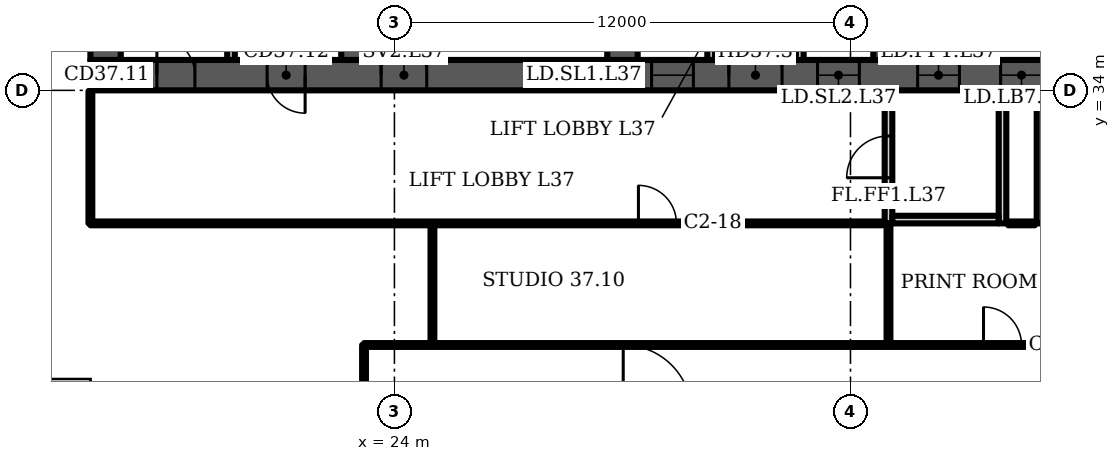
"""IFC4 building model, lengths in metres.
Left out: names, types, materials, properties, quantities, classifications, styles, units other than length and angle.
Written with IfcOpenShell. Run it as: python <this file> out.ifc"""

import sys

from ifc_helpers import new_model, si_unit, direction, frame, frame_2d, origin, place, context, subcontext, project, spatial, polyline, rectangle, outline, extrude, element, fill, save


model = new_model("IFC4")
c1 = context("Model", 3, precision=1e-05, world=origin(), true_north=direction((0.0, 1.0)))
c2 = subcontext(c1, "Body", "Model", "MODEL_VIEW")
j1 = project(units=[si_unit("LENGTHUNIT", "METRE"), si_unit("PLANEANGLEUNIT", "RADIAN")], contexts=[c1])
p1 = place(None, origin())
s1 = spatial("IfcSite", under=j1, at=p1, CompositionType="ELEMENT")
p2 = place(p1, origin())
s2 = spatial("IfcBuilding", under=s1, at=p2, CompositionType="ELEMENT")
p3 = place(p2, frame((0.0, 0.0, 155.5)))
s3 = spatial("IfcBuildingStorey", under=s2, at=p3, CompositionType="ELEMENT", Elevation=155.5)
p4 = place(p3, frame((16.0, 34.4, 0.0), z_axis=(0.0, 0.0, 1.0), x_axis=(1.0, 0.0, 0.0)))
e1 = element("IfcWall", 1, at=p4, inside=s3, PredefinedType="SHEAR", context=c2, shape_type="SweptSolid", body=[
    extrude(rectangle(XDim=42.0, YDim=0.8, at=frame_2d((21.0, 0.0))), origin(), (0.0, 0.0, 1.0), 3.6),
])
p5 = place(p4, frame((1.75, 0.0, 0.0)))
e2 = element("IfcOpeningElement", 2, at=p5, cuts=e1, PredefinedType="OPENING", context=c2, shape_type="SweptSolid", body=[
    extrude(rectangle(XDim=1.0, YDim=2.1, at=frame_2d((0.5, 1.05))), frame((0.0, 0.41, 0.0), z_axis=(0.0, -1.0, 0.0), x_axis=(1.0, 0.0, 0.0)), (0.0, 0.0, 1.0), 0.82),
])
p6 = place(p4, frame((4.65, 0.0, 0.0)))
e3 = element("IfcOpeningElement", 3, at=p6, cuts=e1, PredefinedType="OPENING", context=c2, shape_type="SweptSolid", body=[
    extrude(rectangle(XDim=1.0, YDim=2.1, at=frame_2d((0.5, 1.05))), frame((0.0, 0.41, 0.0), z_axis=(0.0, -1.0, 0.0), x_axis=(1.0, 0.0, 0.0)), (0.0, 0.0, 1.0), 0.82),
])
p7 = place(p4, frame((7.65, 0.0, 0.0)))
e4 = element("IfcOpeningElement", 4, at=p7, cuts=e1, PredefinedType="OPENING", context=c2, shape_type="SweptSolid", body=[
    extrude(rectangle(XDim=1.2, YDim=2.1, at=frame_2d((0.6, 1.05))), frame((0.0, 0.41, 0.0), z_axis=(0.0, -1.0, 0.0), x_axis=(1.0, 0.0, 0.0)), (0.0, 0.0, 1.0), 0.82),
])
p8 = place(p4, frame((14.767, 0.0, 0.0)))
e5 = element("IfcOpeningElement", 5, at=p8, cuts=e1, PredefinedType="OPENING", context=c2, shape_type="SweptSolid", body=[
    extrude(rectangle(XDim=1.1, YDim=2.1, at=frame_2d((0.55, 1.05))), frame((0.0, 0.41, 0.0), z_axis=(0.0, -1.0, 0.0), x_axis=(1.0, 0.0, 0.0)), (0.0, 0.0, 1.0), 0.82),
])
p9 = place(p4, frame((19.133, 0.0, 0.0)))
e6 = element("IfcOpeningElement", 6, at=p9, cuts=e1, PredefinedType="OPENING", context=c2, shape_type="SweptSolid", body=[
    extrude(rectangle(XDim=1.1, YDim=2.1, at=frame_2d((0.55, 1.05))), frame((0.0, 0.41, 0.0), z_axis=(0.0, -1.0, 0.0), x_axis=(1.0, 0.0, 0.0)), (0.0, 0.0, 1.0), 0.82),
])
p10 = place(p4, frame((16.8, 0.0, 0.0)))
e7 = element("IfcOpeningElement", 7, at=p10, cuts=e1, PredefinedType="OPENING", context=c2, shape_type="SweptSolid", body=[
    extrude(rectangle(XDim=1.4, YDim=2.1, at=frame_2d((0.7, 1.05))), frame((0.0, 0.41, 0.0), z_axis=(0.0, -1.0, 0.0), x_axis=(1.0, 0.0, 0.0)), (0.0, 0.0, 1.0), 0.82),
])
p11 = place(p4, frame((21.767, 0.0, 0.0)))
e8 = element("IfcOpeningElement", 8, at=p11, cuts=e1, PredefinedType="OPENING", context=c2, shape_type="SweptSolid", body=[
    extrude(rectangle(XDim=1.1, YDim=2.1, at=frame_2d((0.55, 1.05))), frame((0.0, 0.41, 0.0), z_axis=(0.0, -1.0, 0.0), x_axis=(1.0, 0.0, 0.0)), (0.0, 0.0, 1.0), 0.82),
])
p12 = place(p4, frame((23.95, 0.0, 0.0)))
e9 = element("IfcOpeningElement", 9, at=p12, cuts=e1, PredefinedType="OPENING", context=c2, shape_type="SweptSolid", body=[
    extrude(rectangle(XDim=1.1, YDim=2.1, at=frame_2d((0.55, 1.05))), frame((0.0, 0.41, 0.0), z_axis=(0.0, -1.0, 0.0), x_axis=(1.0, 0.0, 0.0)), (0.0, 0.0, 1.0), 0.82),
])
p13 = place(p4, frame((26.133, 0.0, 0.0)))
e10 = element("IfcOpeningElement", 10, at=p13, cuts=e1, PredefinedType="OPENING", context=c2, shape_type="SweptSolid", body=[
    extrude(rectangle(XDim=1.1, YDim=2.1, at=frame_2d((0.55, 1.05))), frame((0.0, 0.41, 0.0), z_axis=(0.0, -1.0, 0.0), x_axis=(1.0, 0.0, 0.0)), (0.0, 0.0, 1.0), 0.82),
])
p14 = place(p4, frame((33.15, 0.0, 0.0)))
e11 = element("IfcOpeningElement", 11, at=p14, cuts=e1, PredefinedType="OPENING", context=c2, shape_type="SweptSolid", body=[
    extrude(rectangle(XDim=1.2, YDim=2.1, at=frame_2d((0.6, 1.05))), frame((0.0, 0.41, 0.0), z_axis=(0.0, -1.0, 0.0), x_axis=(1.0, 0.0, 0.0)), (0.0, 0.0, 1.0), 0.82),
])
p15 = place(p4, frame((35.817, 0.0, 0.0)))
e12 = element("IfcOpeningElement", 12, at=p15, cuts=e1, PredefinedType="OPENING", context=c2, shape_type="SweptSolid", body=[
    extrude(rectangle(XDim=1.0, YDim=2.1, at=frame_2d((0.5, 1.05))), frame((0.0, 0.41, 0.0), z_axis=(0.0, -1.0, 0.0), x_axis=(1.0, 0.0, 0.0)), (0.0, 0.0, 1.0), 0.82),
])
p16 = place(p4, frame((39.95, 0.0, 0.0)))
e13 = element("IfcOpeningElement", 13, at=p16, cuts=e1, PredefinedType="OPENING", context=c2, shape_type="SweptSolid", body=[
    extrude(rectangle(XDim=1.0, YDim=2.1, at=frame_2d((0.5, 1.05))), frame((0.0, 0.41, 0.0), z_axis=(0.0, -1.0, 0.0), x_axis=(1.0, 0.0, 0.0)), (0.0, 0.0, 1.0), 0.82),
])
p17 = place(p4, frame((37.767, 0.0, 0.0)))
e14 = element("IfcOpeningElement", 14, at=p17, cuts=e1, PredefinedType="OPENING", context=c2, shape_type="SweptSolid", body=[
    extrude(rectangle(XDim=1.4, YDim=2.1, at=frame_2d((0.7, 1.05))), frame((0.0, 0.41, 0.0), z_axis=(0.0, -1.0, 0.0), x_axis=(1.0, 0.0, 0.0)), (0.0, 0.0, 1.0), 0.82),
])
p18 = place(p3, frame((16.4, 34.8, 0.0), z_axis=(0.0, 0.0, 1.0), x_axis=(0.0, 1.0, 0.0)))
e15 = element("IfcWall", 15, at=p18, inside=s3, PredefinedType="SHEAR", context=c2, shape_type="SweptSolid", body=[
    extrude(rectangle(XDim=13.184, YDim=0.8, at=frame_2d((6.592, 0.0))), origin(), (0.0, 0.0, 1.0), 3.6),
])
p19 = place(p3, frame((23.0, 34.8, 0.0), z_axis=(0.0, 0.0, 1.0), x_axis=(0.0, 1.0, 0.0)))
e16 = element("IfcWall", 16, at=p19, inside=s3, PredefinedType="SHEAR", context=c2, shape_type="SweptSolid", body=[
    extrude(rectangle(XDim=13.762, YDim=0.8, at=frame_2d((6.881, 0.0))), origin(), (0.0, 0.0, 1.0), 3.6),
])
p20 = place(p19, frame((10.0, 0.0, 0.0)))
e17 = element("IfcOpeningElement", 17, at=p20, cuts=e16, PredefinedType="OPENING", context=c2, shape_type="SweptSolid", body=[
    extrude(rectangle(XDim=1.0, YDim=2.1, at=frame_2d((0.5, 1.05))), frame((0.0, 0.41, 0.0), z_axis=(0.0, -1.0, 0.0), x_axis=(1.0, 0.0, 0.0)), (0.0, 0.0, 1.0), 0.82),
])
p21 = place(p3, frame((30.0, 34.8, 0.0), z_axis=(0.0, 0.0, 1.0), x_axis=(0.0, 1.0, 0.0)))
e18 = element("IfcWall", 18, at=p21, inside=s3, PredefinedType="SHEAR", context=c2, shape_type="SweptSolid", body=[
    extrude(rectangle(XDim=14.374, YDim=0.8, at=frame_2d((7.187, 0.0))), origin(), (0.0, 0.0, 1.0), 3.6),
])
p22 = place(p21, frame((3.6, 0.0, 0.0)))
e19 = element("IfcOpeningElement", 19, at=p22, cuts=e18, PredefinedType="OPENING", context=c2, shape_type="SweptSolid", body=[
    extrude(rectangle(XDim=1.1, YDim=2.1, at=frame_2d((0.55, 1.05))), frame((0.0, 0.41, 0.0), z_axis=(0.0, -1.0, 0.0), x_axis=(1.0, 0.0, 0.0)), (0.0, 0.0, 1.0), 0.82),
])
p23 = place(p3, frame((37.0, 34.8, 0.0), z_axis=(0.0, 0.0, 1.0), x_axis=(0.0, 1.0, 0.0)))
e20 = element("IfcWall", 20, at=p23, inside=s3, PredefinedType="SHEAR", context=c2, shape_type="SweptSolid", body=[
    extrude(rectangle(XDim=14.987, YDim=0.8, at=frame_2d((7.493, 0.0))), origin(), (0.0, 0.0, 1.0), 3.6),
])
p24 = place(p23, frame((11.312, 0.0, 0.0)))
e21 = element("IfcOpeningElement", 21, at=p24, cuts=e20, PredefinedType="OPENING", context=c2, shape_type="SweptSolid", body=[
    extrude(rectangle(XDim=1.0, YDim=2.1, at=frame_2d((0.5, 1.05))), frame((0.0, 0.41, 0.0), z_axis=(0.0, -1.0, 0.0), x_axis=(1.0, 0.0, 0.0)), (0.0, 0.0, 1.0), 0.82),
])
p25 = place(p23, frame((3.6, 0.0, 0.0)))
e22 = element("IfcOpeningElement", 22, at=p25, cuts=e20, PredefinedType="OPENING", context=c2, shape_type="SweptSolid", body=[
    extrude(rectangle(XDim=1.1, YDim=2.1, at=frame_2d((0.55, 1.05))), frame((0.0, 0.41, 0.0), z_axis=(0.0, -1.0, 0.0), x_axis=(1.0, 0.0, 0.0)), (0.0, 0.0, 1.0), 0.82),
])
p26 = place(p3, frame((19.7, 34.8, 0.0), z_axis=(0.0, 0.0, 1.0), x_axis=(0.0, 1.0, 0.0)))
e23 = element("IfcWall", 23, at=p26, inside=s3, PredefinedType="PARTITIONING", context=c2, shape_type="SweptSolid", body=[
    extrude(rectangle(XDim=13.234, YDim=0.2, at=frame_2d((6.617, 0.0))), origin(), (0.0, 0.0, 1.0), 3.2),
])
p27 = place(p3, frame((0.0, 0.0, -0.0)))
e24 = element("IfcWall", 24, at=p27, inside=s3, PredefinedType="PARTITIONING", context=c2, shape_type="SweptSolid", body=[
    extrude(outline(polyline([(32.233, 37.65), (30.4, 37.65), (30.4, 37.85), (32.233, 37.85), (32.433, 37.85), (32.433, 34.8), (32.233, 34.8), (32.233, 37.65)])), origin(), (0.0, 0.0, 1.0), 3.2),
])
p28 = place(p3, frame((0.0, 0.0, -0.0)))
e25 = element("IfcWall", 25, at=p28, inside=s3, PredefinedType="PARTITIONING", context=c2, shape_type="SweptSolid", body=[
    extrude(outline(polyline([(34.567, 37.85), (34.767, 37.85), (36.6, 37.85), (36.6, 37.65), (34.767, 37.65), (34.767, 34.8), (34.567, 34.8), (34.567, 37.85)])), origin(), (0.0, 0.0, 1.0), 3.2),
])
p29 = place(p3, frame((0.0, 0.0, -0.0)))
e26 = element("IfcWall", 26, at=p29, inside=s3, PredefinedType="PARTITIONING", context=c2, shape_type="SweptSolid", body=[
    extrude(outline(polyline([(41.567, 37.1), (39.433, 37.1), (39.433, 34.8), (39.233, 34.8), (39.233, 37.65), (37.4, 37.65), (37.4, 37.85), (39.233, 37.85), (39.433, 37.85), (39.433, 37.3), (41.567, 37.3), (41.567, 37.55), (41.767, 37.55), (43.6, 37.55), (43.6, 37.35), (41.767, 37.35), (41.767, 34.8), (41.567, 34.8), (41.567, 37.1)])), origin(), (0.0, 0.0, 1.0), 3.2),
])
p30 = place(p3, frame((37.0, 30.5, 0.0), z_axis=(0.0, 0.0, 1.0), x_axis=(0.0, 1.0, 0.0)))
e27 = element("IfcWall", 27, at=p30, inside=s3, PredefinedType="PARTITIONING", context=c2, shape_type="SweptSolid", body=[
    extrude(rectangle(XDim=3.5, YDim=0.2, at=frame_2d((1.75, 0.0))), origin(), (0.0, 0.0, 1.0), 3.2),
])
p31 = place(p30, frame((1.2, 0.0, 0.0)))
e28 = element("IfcOpeningElement", 28, at=p31, cuts=e27, PredefinedType="OPENING", context=c2, shape_type="SweptSolid", body=[
    extrude(rectangle(XDim=1.1, YDim=2.1, at=frame_2d((0.55, 1.05))), frame((0.0, 0.11, 0.0), z_axis=(0.0, -1.0, 0.0), x_axis=(1.0, 0.0, 0.0)), (0.0, 0.0, 1.0), 0.22),
])
p32 = place(p3, frame((40.0, 30.5, 0.0), z_axis=(0.0, 0.0, 1.0), x_axis=(0.0, 1.0, 0.0)))
e29 = element("IfcWall", 29, at=p32, inside=s3, PredefinedType="PARTITIONING", context=c2, shape_type="SweptSolid", body=[
    extrude(rectangle(XDim=3.5, YDim=0.2, at=frame_2d((1.75, 0.0))), origin(), (0.0, 0.0, 1.0), 3.2),
])
p33 = place(p3, frame((37.1, 30.6, 0.0), z_axis=(0.0, 0.0, 1.0), x_axis=(1.0, 0.0, 0.0)))
e30 = element("IfcWall", 30, at=p33, inside=s3, PredefinedType="PARTITIONING", context=c2, shape_type="SweptSolid", body=[
    extrude(rectangle(XDim=2.8, YDim=0.2, at=frame_2d((1.4, 0.0))), origin(), (0.0, 0.0, 1.0), 3.2),
])
p34 = place(p3, frame((41.0, 30.5, 0.0), z_axis=(0.0, 0.0, 1.0), x_axis=(0.0, 1.0, 0.0)))
e31 = element("IfcWall", 31, at=p34, inside=s3, PredefinedType="PARTITIONING", context=c2, shape_type="SweptSolid", body=[
    extrude(rectangle(XDim=3.5, YDim=0.2, at=frame_2d((1.75, 0.0))), origin(), (0.0, 0.0, 1.0), 3.2),
])
p35 = place(p3, frame((16.0, 30.5, 0.0), z_axis=(0.0, 0.0, 1.0), x_axis=(0.0, 1.0, 0.0)))
e32 = element("IfcWall", 32, at=p35, inside=s3, PredefinedType="PARTITIONING", context=c2, shape_type="SweptSolid", body=[
    extrude(rectangle(XDim=3.48, YDim=0.1, at=frame_2d((1.74, 0.0))), origin(), (0.0, 0.0, 1.0), 3.2),
])
p36 = place(p3, frame((16.0, 30.5, 0.0), z_axis=(0.0, 0.0, 1.0), x_axis=(1.0, 0.0, 0.0)))
e33 = element("IfcWall", 33, at=p36, inside=s3, PredefinedType="PARTITIONING", context=c2, shape_type="SweptSolid", body=[
    extrude(rectangle(XDim=20.85, YDim=0.1, at=frame_2d((10.425, 0.0))), origin(), (0.0, 0.0, 1.0), 3.2),
])
p37 = place(p36, frame((14.42, 0.0, 0.0)))
e34 = element("IfcOpeningElement", 34, at=p37, cuts=e33, PredefinedType="OPENING", context=c2, shape_type="SweptSolid", body=[
    extrude(rectangle(XDim=1.0, YDim=2.1, at=frame_2d((0.5, 1.05))), frame((0.0, 0.06, 0.0), z_axis=(0.0, -1.0, 0.0), x_axis=(1.0, 0.0, 0.0)), (0.0, 0.0, 1.0), 0.12),
])
p38 = place(p3, frame((23.2, 25.125, 0.0), z_axis=(0.0, 0.0, 1.0), x_axis=(0.0, 1.0, 0.0)))
e35 = element("IfcWall", 35, at=p38, inside=s3, PredefinedType="PARTITIONING", context=c2, shape_type="SweptSolid", body=[
    extrude(rectangle(XDim=2.175, YDim=0.1, at=frame_2d((1.087, 0.0))), origin(), (0.0, 0.0, 1.0), 3.2),
])
p39 = place(p3, frame((23.2, 27.3, 0.0), z_axis=(0.0, 0.0, 1.0), x_axis=(1.0, 0.0, 0.0)))
e36 = element("IfcWall", 36, at=p39, inside=s3, PredefinedType="PARTITIONING", context=c2, shape_type="SweptSolid", body=[
    extrude(rectangle(XDim=33.9, YDim=0.1, at=frame_2d((16.95, 0.0))), origin(), (0.0, 0.0, 1.0), 3.2),
])
p40 = place(p39, frame((16.3, 0.0, 0.0)))
e37 = element("IfcOpeningElement", 37, at=p40, cuts=e36, PredefinedType="OPENING", context=c2, shape_type="SweptSolid", body=[
    extrude(rectangle(XDim=1.0, YDim=2.1, at=frame_2d((0.5, 1.05))), frame((0.0, 0.06, 0.0), z_axis=(0.0, -1.0, 0.0), x_axis=(1.0, 0.0, 0.0)), (0.0, 0.0, 1.0), 0.12),
])
p41 = place(p39, frame((20.72, 0.0, 0.0)))
e38 = element("IfcOpeningElement", 38, at=p41, cuts=e36, PredefinedType="OPENING", context=c2, shape_type="SweptSolid", body=[
    extrude(rectangle(XDim=1.0, YDim=2.1, at=frame_2d((0.5, 1.05))), frame((0.0, 0.06, 0.0), z_axis=(0.0, -1.0, 0.0), x_axis=(1.0, 0.0, 0.0)), (0.0, 0.0, 1.0), 0.12),
])
p42 = place(p39, frame((23.54, 0.0, 0.0)))
e39 = element("IfcOpeningElement", 39, at=p42, cuts=e36, PredefinedType="OPENING", context=c2, shape_type="SweptSolid", body=[
    extrude(rectangle(XDim=1.0, YDim=2.1, at=frame_2d((0.5, 1.05))), frame((0.0, 0.06, 0.0), z_axis=(0.0, -1.0, 0.0), x_axis=(1.0, 0.0, 0.0)), (0.0, 0.0, 1.0), 0.12),
])
p43 = place(p39, frame((26.36, 0.0, 0.0)))
e40 = element("IfcOpeningElement", 40, at=p43, cuts=e36, PredefinedType="OPENING", context=c2, shape_type="SweptSolid", body=[
    extrude(rectangle(XDim=1.0, YDim=2.1, at=frame_2d((0.5, 1.05))), frame((0.0, 0.06, 0.0), z_axis=(0.0, -1.0, 0.0), x_axis=(1.0, 0.0, 0.0)), (0.0, 0.0, 1.0), 0.12),
])
p44 = place(p39, frame((29.18, 0.0, 0.0)))
e41 = element("IfcOpeningElement", 41, at=p44, cuts=e36, PredefinedType="OPENING", context=c2, shape_type="SweptSolid", body=[
    extrude(rectangle(XDim=1.0, YDim=2.1, at=frame_2d((0.5, 1.05))), frame((0.0, 0.06, 0.0), z_axis=(0.0, -1.0, 0.0), x_axis=(1.0, 0.0, 0.0)), (0.0, 0.0, 1.0), 0.12),
])
p45 = place(p39, frame((32.0, 0.0, 0.0)))
e42 = element("IfcOpeningElement", 42, at=p45, cuts=e36, PredefinedType="OPENING", context=c2, shape_type="SweptSolid", body=[
    extrude(rectangle(XDim=1.0, YDim=2.1, at=frame_2d((0.5, 1.05))), frame((0.0, 0.06, 0.0), z_axis=(0.0, -1.0, 0.0), x_axis=(1.0, 0.0, 0.0)), (0.0, 0.0, 1.0), 0.12),
])
for number, where, z_axis, x_axis in (
    (43, (25.0, 27.3, 0.0), (0.0, 0.0, 1.0), (0.0, 1.0, 0.0)),
    (44, (37.0, 27.3, 0.0), (0.0, 0.0, 1.0), (0.0, 1.0, 0.0)),
):
    element("IfcWall", number, at=place(p3, frame(where, z_axis=z_axis, x_axis=x_axis)), inside=s3, PredefinedType="PARTITIONING", context=c2, shape_type="SweptSolid", body=[
        extrude(rectangle(XDim=3.2, YDim=0.1, at=frame_2d((1.6, 0.0))), origin(), (0.0, 0.0, 1.0), 3.2),
    ])
p46 = place(p3, frame((40.15, 30.5, 0.0), z_axis=(0.0, 0.0, 1.0), x_axis=(1.0, 0.0, 0.0)))
e45 = element("IfcWall", 45, at=p46, inside=s3, PredefinedType="PARTITIONING", context=c2, shape_type="SweptSolid", body=[
    extrude(rectangle(XDim=0.7, YDim=0.1, at=frame_2d((0.35, 0.0))), origin(), (0.0, 0.0, 1.0), 3.2),
])
p47 = place(p5, origin())
e46 = element("IfcDoor", 46, at=p47, inside=s3, OperationType="SINGLE_SWING_LEFT", PredefinedType="DOOR", context=c2, shape_type="SweptSolid", body=[
    extrude(rectangle(XDim=1.0, YDim=2.1, at=frame_2d((0.5, 1.05))), frame((0.0, 0.4, 0.0), z_axis=(0.0, -1.0, 0.0), x_axis=(1.0, 0.0, 0.0)), (0.0, 0.0, 1.0), 0.8),
])
fill(e2, e46)
p48 = place(p6, origin())
e47 = element("IfcDoor", 47, at=p48, inside=s3, OperationType="SINGLE_SWING_RIGHT", PredefinedType="DOOR", context=c2, shape_type="SweptSolid", body=[
    extrude(rectangle(XDim=1.0, YDim=2.1, at=frame_2d((0.5, 1.05))), frame((0.0, 0.4, 0.0), z_axis=(0.0, -1.0, 0.0), x_axis=(1.0, 0.0, 0.0)), (0.0, 0.0, 1.0), 0.8),
])
fill(e3, e47)
p49 = place(p7, origin())
e48 = element("IfcDoor", 48, at=p49, inside=s3, OperationType="SINGLE_SWING_LEFT", PredefinedType="DOOR", context=c2, shape_type="SweptSolid", body=[
    extrude(rectangle(XDim=1.2, YDim=2.1, at=frame_2d((0.6, 1.05))), frame((0.0, 0.025, 0.0), z_axis=(0.0, -1.0, 0.0), x_axis=(1.0, 0.0, 0.0)), (0.0, 0.0, 1.0), 0.05),
])
fill(e4, e48)
p50 = place(p8, origin())
e49 = element("IfcDoor", 49, at=p50, inside=s3, OperationType="DOUBLE_DOOR_SLIDING", PredefinedType="DOOR", context=c2, shape_type="SweptSolid", body=[
    extrude(rectangle(XDim=1.1, YDim=2.1, at=frame_2d((0.55, 1.05))), frame((0.0, 0.025, 0.0), z_axis=(0.0, -1.0, 0.0), x_axis=(1.0, 0.0, 0.0)), (0.0, 0.0, 1.0), 0.05),
])
fill(e5, e49)
p51 = place(p9, origin())
e50 = element("IfcDoor", 50, at=p51, inside=s3, OperationType="DOUBLE_DOOR_SLIDING", PredefinedType="DOOR", context=c2, shape_type="SweptSolid", body=[
    extrude(rectangle(XDim=1.1, YDim=2.1, at=frame_2d((0.55, 1.05))), frame((0.0, 0.025, 0.0), z_axis=(0.0, -1.0, 0.0), x_axis=(1.0, 0.0, 0.0)), (0.0, 0.0, 1.0), 0.05),
])
fill(e6, e50)
p52 = place(p10, origin())
e51 = element("IfcDoor", 51, at=p52, inside=s3, OperationType="DOUBLE_DOOR_SINGLE_SWING", PredefinedType="DOOR", context=c2, shape_type="SweptSolid", body=[
    extrude(rectangle(XDim=1.4, YDim=2.1, at=frame_2d((0.7, 1.05))), frame((0.0, 0.025, 0.0), z_axis=(0.0, -1.0, 0.0), x_axis=(1.0, 0.0, 0.0)), (0.0, 0.0, 1.0), 0.05),
])
fill(e7, e51)
p53 = place(p11, origin())
e52 = element("IfcDoor", 52, at=p53, inside=s3, OperationType="DOUBLE_DOOR_SLIDING", PredefinedType="DOOR", context=c2, shape_type="SweptSolid", body=[
    extrude(rectangle(XDim=1.1, YDim=2.1, at=frame_2d((0.55, 1.05))), frame((0.0, 0.025, 0.0), z_axis=(0.0, -1.0, 0.0), x_axis=(1.0, 0.0, 0.0)), (0.0, 0.0, 1.0), 0.05),
])
fill(e8, e52)
p54 = place(p12, origin())
e53 = element("IfcDoor", 53, at=p54, inside=s3, OperationType="DOUBLE_DOOR_SLIDING", PredefinedType="DOOR", context=c2, shape_type="SweptSolid", body=[
    extrude(rectangle(XDim=1.1, YDim=2.1, at=frame_2d((0.55, 1.05))), frame((0.0, 0.025, 0.0), z_axis=(0.0, -1.0, 0.0), x_axis=(1.0, 0.0, 0.0)), (0.0, 0.0, 1.0), 0.05),
])
fill(e9, e53)
p55 = place(p31, origin())
e54 = element("IfcDoor", 54, at=p55, inside=s3, OperationType="SINGLE_SWING_LEFT", PredefinedType="DOOR", context=c2, shape_type="SweptSolid", body=[
    extrude(rectangle(XDim=1.1, YDim=2.1, at=frame_2d((0.55, 1.05))), frame((0.0, 0.025, 0.0), z_axis=(0.0, -1.0, 0.0), x_axis=(1.0, 0.0, 0.0)), (0.0, 0.0, 1.0), 0.05),
])
fill(e28, e54)
p56 = place(p40, origin())
e55 = element("IfcDoor", 55, at=p56, inside=s3, OperationType="SINGLE_SWING_LEFT", PredefinedType="DOOR", context=c2, shape_type="SweptSolid", body=[
    extrude(rectangle(XDim=1.0, YDim=2.1, at=frame_2d((0.5, 1.05))), frame((0.0, 0.025, 0.0), z_axis=(0.0, -1.0, 0.0), x_axis=(1.0, 0.0, 0.0)), (0.0, 0.0, 1.0), 0.05),
])
fill(e37, e55)
p57 = place(p37, origin())
e56 = element("IfcDoor", 56, at=p57, inside=s3, OperationType="SINGLE_SWING_LEFT", PredefinedType="DOOR", context=c2, shape_type="SweptSolid", body=[
    extrude(rectangle(XDim=1.0, YDim=2.1, at=frame_2d((0.5, 1.05))), frame((0.0, 0.025, 0.0), z_axis=(0.0, -1.0, 0.0), x_axis=(1.0, 0.0, 0.0)), (0.0, 0.0, 1.0), 0.05),
])
fill(e34, e56)
save(model, sys.argv[1])
